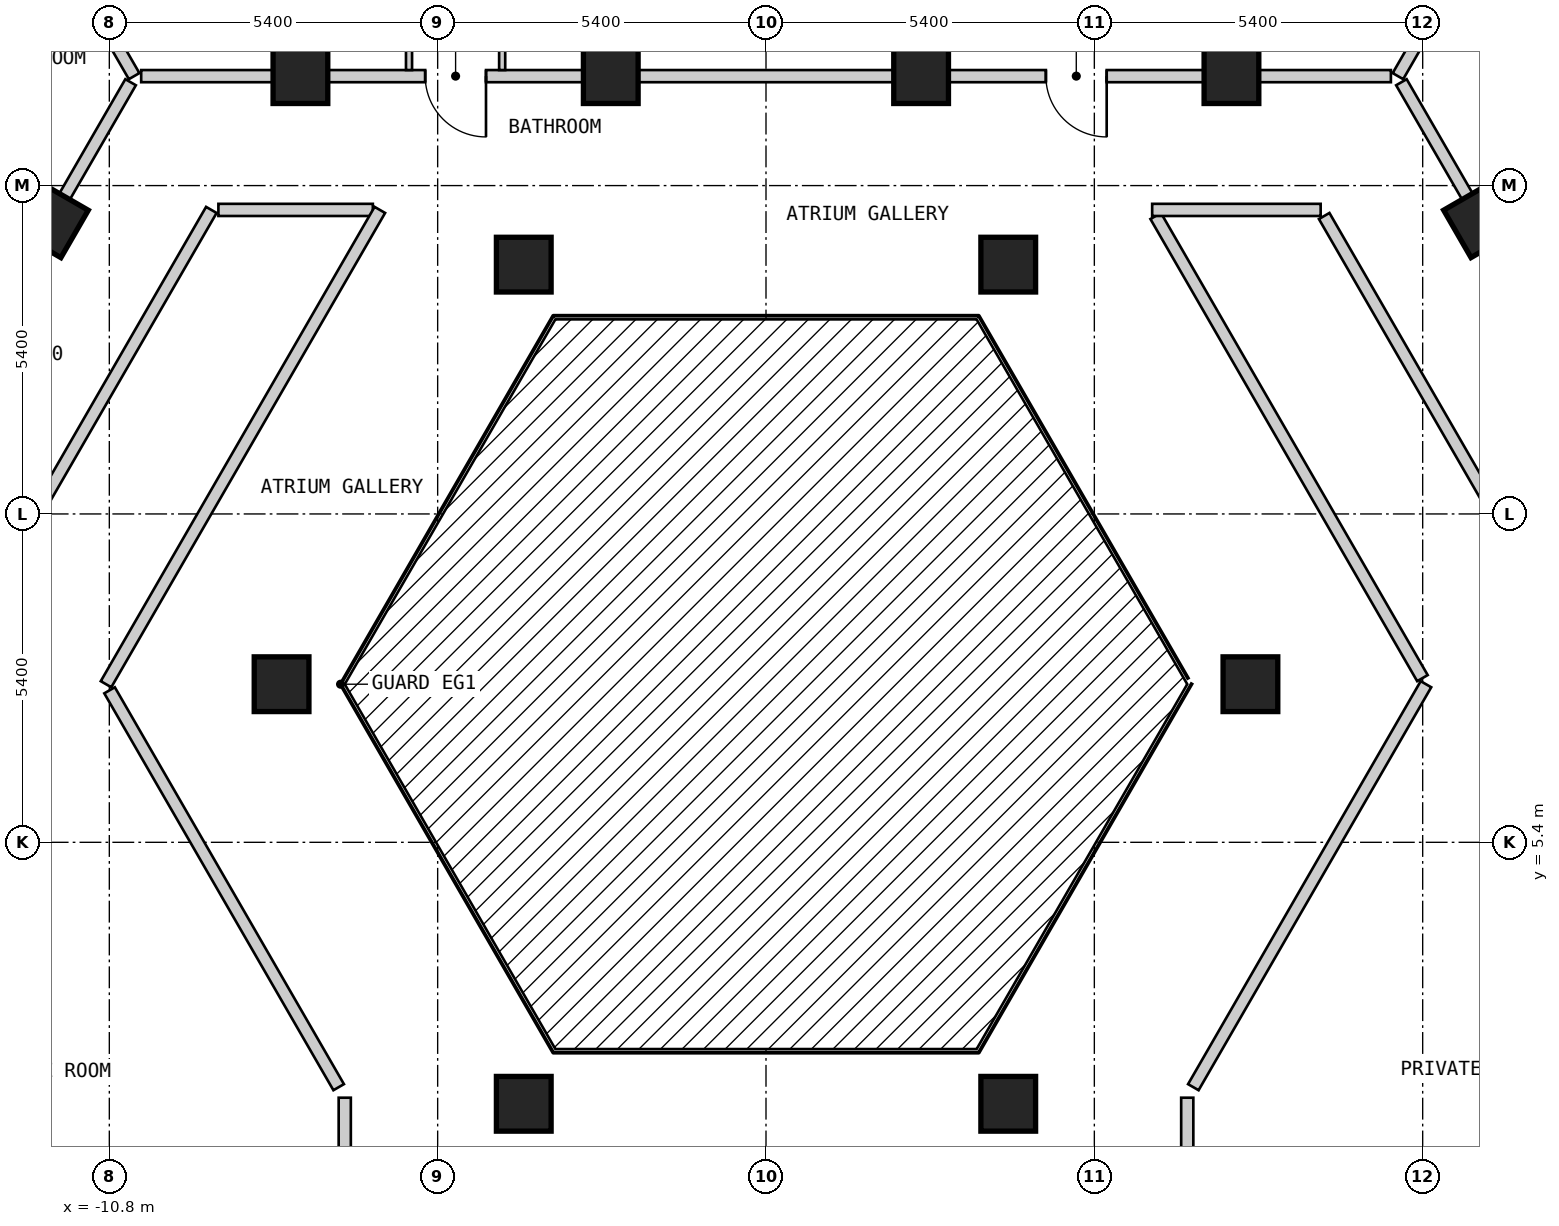
"""IFC4 building model, lengths in metres.
Left out: names, types, materials, properties, quantities, classifications, styles, units other than length and angle.
Written with IfcOpenShell. Run it as: python <this file> out.ifc"""

import sys

from ifc_helpers import new_model, si_unit, direction, frame, frame_2d, origin, origin_2d, place, context, subcontext, project, spatial, rectangle, extrude, element, fill, save


model = new_model("IFC4")
c1 = context("Model", 3, precision=1e-05, world=origin(), true_north=direction((0.0, 1.0)))
c2 = subcontext(c1, "Body", "Model", "MODEL_VIEW")
j1 = project(units=[si_unit("LENGTHUNIT", "METRE"), si_unit("PLANEANGLEUNIT", "RADIAN")], contexts=[c1])
p1 = place(None, origin())
s1 = spatial("IfcSite", under=j1, at=p1, CompositionType="ELEMENT")
p2 = place(p1, origin())
s2 = spatial("IfcBuilding", under=s1, at=p2, CompositionType="ELEMENT")
p3 = place(p2, frame((0.0, 0.0, 50.4)))
s3 = spatial("IfcBuildingStorey", under=s2, at=p3, CompositionType="ELEMENT", Elevation=50.4)
for number, where, z_axis, x_axis in (
    (1, (3.984, 1.1, 0.0), (0.0, 0.0, 1.0), (1.0, 0.0, 0.0)),
    (2, (7.967, 8.0, 0.0), (0.0, 0.0, 1.0), (1.0, 0.0, 0.0)),
    (3, (11.76, 15.631, 0.0), (0.0, 0.0, 1.0), (-0.5, 0.866, 0.0)),
    (4, (7.655, 18.0, 0.0), (0.0, 0.0, 1.0), (-1.0, 0.0, 0.0)),
    (5, (3.984, 14.9, 0.0), (0.0, 0.0, 1.0), (1.0, 0.0, 0.0)),
    (6, (2.551, 18.0, 0.0), (0.0, 0.0, 1.0), (-1.0, 0.0, 0.0)),
    (7, (-2.553, 18.0, 0.0), (0.0, 0.0, 1.0), (-1.0, 0.0, 0.0)),
    (8, (-3.984, 14.9, 0.0), (0.0, 0.0, 1.0), (1.0, 0.0, 0.0)),
    (9, (-7.657, 18.0, 0.0), (0.0, 0.0, 1.0), (-1.0, 0.0, 0.0)),
    (10, (-11.761, 15.63, 0.0), (0.0, 0.0, 1.0), (-0.5, -0.866, 0.0)),
    (11, (-7.967, 8.0, 0.0), (0.0, 0.0, 1.0), (1.0, 0.0, 0.0)),
    (12, (-3.984, 1.1, 0.0), (0.0, 0.0, 1.0), (1.0, 0.0, 0.0)),
):
    element("IfcColumn", number, at=place(p3, frame(where, z_axis=z_axis, x_axis=x_axis)), inside=s3, PredefinedType="COLUMN", context=c2, shape_type="SweptSolid", body=[
        extrude(rectangle(XDim=0.9, YDim=0.9, at=origin_2d()), origin(), (0.0, 0.0, 1.0), 3.0),
    ])
p4 = place(p3, frame((-10.796, 7.9, 0.0), z_axis=(0.0, 0.0, 1.0), x_axis=(0.499954271211, -0.866051803703, 0.0)))
e13 = element("IfcWall", 13, at=p4, inside=s3, PredefinedType="PARTITIONING", context=c2, shape_type="SweptSolid", body=[
    extrude(rectangle(XDim=7.536, YDim=0.2, at=frame_2d((3.768, 0.0))), origin(), (0.0, 0.0, 1.0), 2.7),
])
p5 = place(p3, frame((6.409, 15.7, 0.0), z_axis=(0.0, 0.0, 1.0), x_axis=(0.499930377127, -0.866065596838, 0.0)))
e14 = element("IfcWall", 14, at=p5, inside=s3, PredefinedType="PARTITIONING", context=c2, shape_type="SweptSolid", body=[
    extrude(rectangle(XDim=8.775, YDim=0.2, at=frame_2d((4.388, 0.0))), origin(), (0.0, 0.0, 1.0), 2.7),
])
p6 = place(p3, frame((9.18, 15.7, 0.0), z_axis=(0.0, 0.0, 1.0), x_axis=(0.500003652032, -0.866023295272, 0.0)))
e15 = element("IfcWall", 15, at=p6, inside=s3, PredefinedType="PARTITIONING", context=c2, shape_type="SweptSolid", body=[
    extrude(rectangle(XDim=18.012, YDim=0.2, at=frame_2d((9.006, 0.0))), origin(), (0.0, 0.0, 1.0), 2.7),
])
p7 = place(p6, frame((8.556, 0.0, 0.0)))
e16 = element("IfcOpeningElement", 16, at=p7, cuts=e15, PredefinedType="OPENING", context=c2, shape_type="SweptSolid", body=[
    extrude(rectangle(XDim=0.9, YDim=2.1, at=frame_2d((0.45, 1.05))), frame((0.0, 0.11, 0.0), z_axis=(0.0, -1.0, 0.0), x_axis=(1.0, 0.0, 0.0)), (0.0, 0.0, 1.0), 0.22),
])
p8 = place(p3, frame((10.45, 17.9, 0.0), z_axis=(0.0, 0.0, 1.0), x_axis=(0.500034352617, -0.866005569383, 0.0)))
e17 = element("IfcWall", 17, at=p8, inside=s3, PredefinedType="PARTITIONING", context=c2, shape_type="SweptSolid", body=[
    extrude(rectangle(XDim=20.553, YDim=0.2, at=frame_2d((10.276, 0.0))), origin(), (0.0, 0.0, 1.0), 2.7),
])
p9 = place(p8, frame((14.902, 0.0, 0.0)))
e18 = element("IfcOpeningElement", 18, at=p9, cuts=e17, PredefinedType="OPENING", context=c2, shape_type="SweptSolid", body=[
    extrude(rectangle(XDim=1.0, YDim=2.1, at=frame_2d((0.5, 1.05))), frame((0.0, 0.11, 0.0), z_axis=(0.0, -1.0, 0.0), x_axis=(1.0, 0.0, 0.0)), (0.0, 0.0, 1.0), 0.22),
])
p10 = place(p8, frame((4.671, 0.0, 0.0)))
e19 = element("IfcOpeningElement", 19, at=p10, cuts=e17, PredefinedType="OPENING", context=c2, shape_type="SweptSolid", body=[
    extrude(rectangle(XDim=1.0, YDim=2.1, at=frame_2d((0.5, 1.05))), frame((0.0, 0.11, 0.0), z_axis=(0.0, -1.0, 0.0), x_axis=(1.0, 0.0, 0.0)), (0.0, 0.0, 1.0), 0.22),
])
p11 = place(p3, frame((-9.006, 15.8, 0.0), z_axis=(0.0, 0.0, 1.0), x_axis=(1.0, 0.0, 0.0)))
e20 = element("IfcWall", 20, at=p11, inside=s3, PredefinedType="PARTITIONING", context=c2, shape_type="SweptSolid", body=[
    extrude(rectangle(XDim=2.54, YDim=0.2, at=frame_2d((1.27, 0.0))), origin(), (0.0, 0.0, 1.0), 2.7),
])
p12 = place(p3, frame((6.351, 15.8, 0.0), z_axis=(0.0, 0.0, 1.0), x_axis=(1.0, 0.0, 0.0)))
e21 = element("IfcWall", 21, at=p12, inside=s3, PredefinedType="PARTITIONING", context=c2, shape_type="SweptSolid", body=[
    extrude(rectangle(XDim=2.771, YDim=0.2, at=frame_2d((1.385, 0.0))), origin(), (0.0, 0.0, 1.0), 2.7),
])
p13 = place(p3, frame((-10.276, 18.0, 0.0), z_axis=(0.0, 0.0, 1.0), x_axis=(1.0, 0.0, 0.0)))
e22 = element("IfcWall", 22, at=p13, inside=s3, PredefinedType="PARTITIONING", context=c2, shape_type="SweptSolid", body=[
    extrude(rectangle(XDim=20.553, YDim=0.2, at=frame_2d((10.276, 0.0))), origin(), (0.0, 0.0, 1.0), 2.7),
])
p14 = place(p13, frame((14.879, 0.0, 0.0)))
e23 = element("IfcOpeningElement", 23, at=p14, cuts=e22, PredefinedType="OPENING", context=c2, shape_type="SweptSolid", body=[
    extrude(rectangle(XDim=1.0, YDim=2.1, at=frame_2d((0.5, 1.05))), frame((0.0, 0.11, 0.0), z_axis=(0.0, -1.0, 0.0), x_axis=(1.0, 0.0, 0.0)), (0.0, 0.0, 1.0), 0.22),
])
p15 = place(p13, frame((4.671, 0.0, 0.0)))
e24 = element("IfcOpeningElement", 24, at=p15, cuts=e22, PredefinedType="OPENING", context=c2, shape_type="SweptSolid", body=[
    extrude(rectangle(XDim=1.0, YDim=2.1, at=frame_2d((0.5, 1.05))), frame((0.0, 0.11, 0.0), z_axis=(0.0, -1.0, 0.0), x_axis=(1.0, 0.0, 0.0)), (0.0, 0.0, 1.0), 0.22),
])
p16 = place(p3, frame((7.028, 1.373, 0.0), z_axis=(0.0, 0.0, 1.0), x_axis=(0.49998574534, 0.86603363356, 0.0)))
e25 = element("IfcWall", 25, at=p16, inside=s3, PredefinedType="PARTITIONING", context=c2, shape_type="SweptSolid", body=[
    extrude(rectangle(XDim=7.652, YDim=0.2, at=frame_2d((3.826, 0.0))), origin(), (0.0, 0.0, 1.0), 2.7),
])
p17 = place(p3, frame((-10.854, 8.0, 0.0), z_axis=(0.0, 0.0, 1.0), x_axis=(0.499964141897, 0.86604610548, 0.0)))
e26 = element("IfcWall", 26, at=p17, inside=s3, PredefinedType="PARTITIONING", context=c2, shape_type="SweptSolid", body=[
    extrude(rectangle(XDim=9.007, YDim=0.2, at=frame_2d((4.503, 0.0))), origin(), (0.0, 0.0, 1.0), 2.7),
])
p18 = place(p3, frame((-18.244, -0.001, 0.0), z_axis=(0.0, 0.0, 1.0), x_axis=(0.499962999376, 0.866046765051, 0.0)))
e27 = element("IfcWall", 27, at=p18, inside=s3, PredefinedType="PARTITIONING", context=c2, shape_type="SweptSolid", body=[
    extrude(rectangle(XDim=18.245, YDim=0.2, at=frame_2d((9.123, 0.0))), origin(), (0.0, 0.0, 1.0), 2.7),
])
p19 = place(p18, frame((8.672, 0.0, 0.0)))
e28 = element("IfcOpeningElement", 28, at=p19, cuts=e27, PredefinedType="OPENING", context=c2, shape_type="SweptSolid", body=[
    extrude(rectangle(XDim=0.9, YDim=2.1, at=frame_2d((0.45, 1.05))), frame((0.0, 0.11, 0.0), z_axis=(0.0, -1.0, 0.0), x_axis=(1.0, 0.0, 0.0)), (0.0, 0.0, 1.0), 0.22),
])
p20 = place(p3, frame((-20.727, 0.099, 0.0), z_axis=(0.0, 0.0, 1.0), x_axis=(0.499993204491, 0.866029327138, 0.0)))
e29 = element("IfcWall", 29, at=p20, inside=s3, PredefinedType="PARTITIONING", context=c2, shape_type="SweptSolid", body=[
    extrude(rectangle(XDim=20.554, YDim=0.2, at=frame_2d((10.277, 0.0))), origin(), (0.0, 0.0, 1.0), 2.7),
])
p21 = place(p20, frame((9.776, 0.0, 0.0)))
e30 = element("IfcOpeningElement", 30, at=p21, cuts=e29, PredefinedType="OPENING", context=c2, shape_type="SweptSolid", body=[
    extrude(rectangle(XDim=1.0, YDim=2.1, at=frame_2d((0.5, 1.05))), frame((0.0, 0.11, 0.0), z_axis=(0.0, -1.0, 0.0), x_axis=(1.0, 0.0, 0.0)), (0.0, 0.0, 1.0), 0.22),
])
p22 = place(p20, frame((4.673, 0.0, 0.0)))
e31 = element("IfcOpeningElement", 31, at=p22, cuts=e29, PredefinedType="OPENING", context=c2, shape_type="SweptSolid", body=[
    extrude(rectangle(XDim=1.0, YDim=2.1, at=frame_2d((0.5, 1.05))), frame((0.0, 0.11, 0.0), z_axis=(0.0, -1.0, 0.0), x_axis=(1.0, 0.0, 0.0)), (0.0, 0.0, 1.0), 0.22),
])
p23 = place(p20, frame((14.88, 0.0, 0.0)))
e32 = element("IfcOpeningElement", 32, at=p23, cuts=e29, PredefinedType="OPENING", context=c2, shape_type="SweptSolid", body=[
    extrude(rectangle(XDim=1.0, YDim=2.1, at=frame_2d((0.5, 1.05))), frame((0.0, 0.11, 0.0), z_axis=(0.0, -1.0, 0.0), x_axis=(1.0, 0.0, 0.0)), (0.0, 0.0, 1.0), 0.22),
])
for number, where, z_axis, x_axis in (
    (33, (6.928, -2.8, 0.0), (0.0, 0.0, 1.0), (0.0, 1.0, 0.0)),
    (34, (-6.928, -2.8, 0.0), (0.0, 0.0, 1.0), (0.0, 1.0, 0.0)),
):
    element("IfcWall", number, at=place(p3, frame(where, z_axis=z_axis, x_axis=x_axis)), inside=s3, PredefinedType="PARTITIONING", context=c2, shape_type="SweptSolid", body=[
        extrude(rectangle(XDim=4.0, YDim=0.2, at=frame_2d((2.0, 0.0))), origin(), (0.0, 0.0, 1.0), 2.7),
    ])
p24 = place(p3, frame((-7.657, 21.844, 0.0), z_axis=(0.0, 0.0, 1.0), x_axis=(0.0, -1.0, 0.0)))
e35 = element("IfcWall", 35, at=p24, inside=s3, PredefinedType="PARTITIONING", context=c2, shape_type="SweptSolid", body=[
    extrude(rectangle(XDim=3.744, YDim=0.1, at=frame_2d((1.872, 0.0))), origin(), (0.0, 0.0, 1.0), 2.7),
])
p25 = place(p3, frame((7.655, 18.1, 0.0), z_axis=(0.0, 0.0, 1.0), x_axis=(0.0, 1.0, 0.0)))
e36 = element("IfcWall", 36, at=p25, inside=s3, PredefinedType="PARTITIONING", context=c2, shape_type="SweptSolid", body=[
    extrude(rectangle(XDim=4.1, YDim=0.1, at=frame_2d((2.05, 0.0))), origin(), (0.0, 0.0, 1.0), 2.7),
])
p26 = place(p25, frame((1.6, 0.0, 0.0)))
e37 = element("IfcOpeningElement", 37, at=p26, cuts=e36, PredefinedType="OPENING", context=c2, shape_type="SweptSolid", body=[
    extrude(rectangle(XDim=0.8, YDim=2.1, at=frame_2d((0.4, 1.05))), frame((0.0, 0.06, 0.0), z_axis=(0.0, -1.0, 0.0), x_axis=(1.0, 0.0, 0.0)), (0.0, 0.0, 1.0), 0.12),
])
p27 = place(p3, frame((2.551, 18.1, 0.0), z_axis=(0.0, 0.0, 1.0), x_axis=(0.0, 1.0, 0.0)))
e38 = element("IfcWall", 38, at=p27, inside=s3, PredefinedType="PARTITIONING", context=c2, shape_type="SweptSolid", body=[
    extrude(rectangle(XDim=4.1, YDim=0.1, at=frame_2d((2.05, 0.0))), origin(), (0.0, 0.0, 1.0), 2.7),
])
p28 = place(p27, frame((1.55, 0.0, 0.0)))
e39 = element("IfcOpeningElement", 39, at=p28, cuts=e38, PredefinedType="OPENING", context=c2, shape_type="SweptSolid", body=[
    extrude(rectangle(XDim=0.9, YDim=2.1, at=frame_2d((0.45, 1.05))), frame((0.0, 0.06, 0.0), z_axis=(0.0, -1.0, 0.0), x_axis=(1.0, 0.0, 0.0)), (0.0, 0.0, 1.0), 0.12),
])
p29 = place(p3, frame((-4.339, 18.1, 0.0), z_axis=(0.0, 0.0, 1.0), x_axis=(0.0, 1.0, 0.0)))
e40 = element("IfcWall", 40, at=p29, inside=s3, PredefinedType="PARTITIONING", context=c2, shape_type="SweptSolid", body=[
    extrude(rectangle(XDim=2.51, YDim=0.1, at=frame_2d((1.255, 0.0))), origin(), (0.0, 0.0, 1.0), 2.7),
])
p30 = place(p29, frame((0.83, 0.0, 0.0)))
e41 = element("IfcOpeningElement", 41, at=p30, cuts=e40, PredefinedType="OPENING", context=c2, shape_type="SweptSolid", body=[
    extrude(rectangle(XDim=0.8, YDim=2.1, at=frame_2d((0.4, 1.05))), frame((0.0, 0.06, 0.0), z_axis=(0.0, -1.0, 0.0), x_axis=(1.0, 0.0, 0.0)), (0.0, 0.0, 1.0), 0.12),
])
p31 = place(p3, frame((-5.871, 18.1, 0.0), z_axis=(0.0, 0.0, 1.0), x_axis=(0.0, 1.0, 0.0)))
e42 = element("IfcWall", 42, at=p31, inside=s3, PredefinedType="PARTITIONING", context=c2, shape_type="SweptSolid", body=[
    extrude(rectangle(XDim=2.559, YDim=0.1, at=frame_2d((1.279, 0.0))), origin(), (0.0, 0.0, 1.0), 2.7),
])
p32 = place(p31, frame((0.78, 0.0, 0.0)))
e43 = element("IfcOpeningElement", 43, at=p32, cuts=e42, PredefinedType="OPENING", context=c2, shape_type="SweptSolid", body=[
    extrude(rectangle(XDim=0.9, YDim=2.1, at=frame_2d((0.45, 1.05))), frame((0.0, 0.06, 0.0), z_axis=(0.0, -1.0, 0.0), x_axis=(1.0, 0.0, 0.0)), (0.0, 0.0, 1.0), 0.12),
])
p33 = place(p3, frame((-12.629, 21.874, 0.0), z_axis=(0.0, 0.0, 1.0), x_axis=(0.500024801635, -0.86601108408, 0.0)))
e44 = element("IfcWall", 44, at=p33, inside=s3, PredefinedType="PARTITIONING", context=c2, shape_type="SweptSolid", body=[
    extrude(rectangle(XDim=4.473, YDim=0.2, at=frame_2d((2.237, 0.0))), origin(), (0.0, 0.0, 1.0), 2.7),
])
p34 = place(p3, frame((10.393, 18.0, 0.0), z_axis=(0.0, 0.0, 1.0), x_axis=(0.499945497007, 0.866056868816, 0.0)))
e45 = element("IfcWall", 45, at=p34, inside=s3, PredefinedType="PARTITIONING", context=c2, shape_type="SweptSolid", body=[
    extrude(rectangle(XDim=10.265, YDim=0.2, at=frame_2d((5.132, 0.0))), origin(), (0.0, 0.0, 1.0), 2.7),
])
p35 = place(p3, frame((-2.553, 18.1, 0.0), z_axis=(0.0, 0.0, 1.0), x_axis=(0.0, 1.0, 0.0)))
e46 = element("IfcWall", 46, at=p35, inside=s3, PredefinedType="PARTITIONING", context=c2, shape_type="SweptSolid", body=[
    extrude(rectangle(XDim=10.0, YDim=0.2, at=frame_2d((5.0, 0.0))), origin(), (0.0, 0.0, 1.0), 2.7),
])
p36 = place(p14, origin())
e47 = element("IfcDoor", 47, at=p36, inside=s3, OperationType="SINGLE_SWING_RIGHT", PredefinedType="DOOR", context=c2, shape_type="SweptSolid", body=[
    extrude(rectangle(XDim=1.0, YDim=2.1, at=frame_2d((0.5, 1.05))), frame((0.0, 0.025, 0.0), z_axis=(0.0, -1.0, 0.0), x_axis=(1.0, 0.0, 0.0)), (0.0, 0.0, 1.0), 0.05),
])
fill(e23, e47)
p37 = place(p15, origin())
e48 = element("IfcDoor", 48, at=p37, inside=s3, OperationType="SINGLE_SWING_RIGHT", PredefinedType="DOOR", context=c2, shape_type="SweptSolid", body=[
    extrude(rectangle(XDim=1.0, YDim=2.1, at=frame_2d((0.5, 1.05))), frame((0.0, 0.025, 0.0), z_axis=(0.0, -1.0, 0.0), x_axis=(1.0, 0.0, 0.0)), (0.0, 0.0, 1.0), 0.05),
])
fill(e24, e48)
save(model, sys.argv[1])
